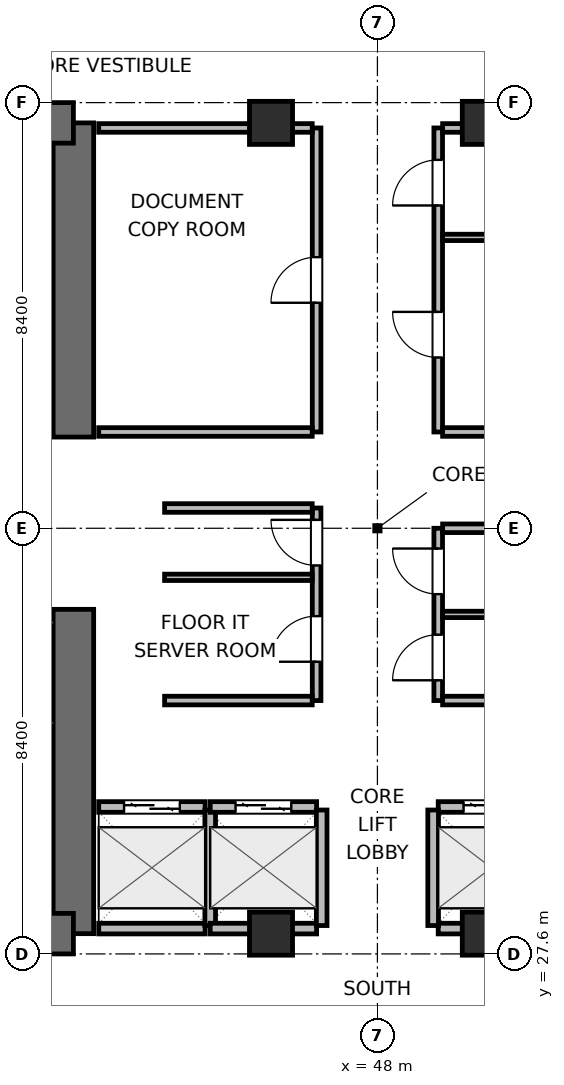
"""IFC4 building model, lengths in metres.
Left out: names, types, materials, properties, quantities, classifications, styles, units other than length and angle.
Written with IfcOpenShell. Run it as: python <this file> out.ifc"""

import sys

from ifc_helpers import new_model, si_unit, direction, frame, frame_2d, origin, origin_2d, place, context, subcontext, project, spatial, rectangle, extrude, element, fill, save


model = new_model("IFC4")
c1 = context("Model", 3, precision=1e-05, world=origin(), true_north=direction((0.0, 1.0)))
c2 = subcontext(c1, "Body", "Model", "MODEL_VIEW")
j1 = project(units=[si_unit("LENGTHUNIT", "METRE"), si_unit("PLANEANGLEUNIT", "RADIAN")], contexts=[c1])
p1 = place(None, origin())
s1 = spatial("IfcSite", under=j1, at=p1, CompositionType="ELEMENT")
p2 = place(p1, origin())
s2 = spatial("IfcBuilding", under=s1, at=p2, CompositionType="ELEMENT")
p3 = place(p2, frame((0.0, 0.0, 109.2)))
s3 = spatial("IfcBuildingStorey", under=s2, at=p3, CompositionType="ELEMENT", Elevation=109.2)
p4 = place(p3, frame((42.0, 28.0, 0.0), z_axis=(0.0, 0.0, 1.0), x_axis=(0.0, 1.0, 0.0)))
e1 = element("IfcWall", 1, at=p4, inside=s3, PredefinedType="SHEAR", context=c2, shape_type="SweptSolid", body=[
    extrude(rectangle(XDim=6.4, YDim=0.8, at=frame_2d((3.2, 0.0))), origin(), (0.0, 0.0, 1.0), 3.9),
])
p5 = place(p3, frame((42.0, 37.8, 0.0), z_axis=(0.0, 0.0, 1.0), x_axis=(0.0, 1.0, 0.0)))
e2 = element("IfcWall", 2, at=p5, inside=s3, PredefinedType="SHEAR", context=c2, shape_type="SweptSolid", body=[
    extrude(rectangle(XDim=6.2, YDim=0.8, at=frame_2d((3.1, 0.0))), origin(), (0.0, 0.0, 1.0), 3.9),
])
p6 = place(p3, frame((32.8, 28.0, 0.0), z_axis=(0.0, 0.0, 1.0), x_axis=(1.0, 0.0, 0.0)))
e3 = element("IfcWall", 3, at=p6, inside=s3, PredefinedType="SHEAR", context=c2, shape_type="SweptSolid", body=[
    extrude(rectangle(XDim=9.2, YDim=0.8, at=frame_2d((4.6, 0.0))), origin(), (0.0, 0.0, 1.0), 3.9),
])
p7 = place(p6, frame((4.975, 0.0, 0.0)))
e4 = element("IfcOpeningElement", 4, at=p7, cuts=e3, PredefinedType="OPENING", context=c2, shape_type="SweptSolid", body=[
    extrude(rectangle(XDim=1.05, YDim=2.04, at=frame_2d((0.525, 1.02))), frame((0.0, 0.41, 0.0), z_axis=(0.0, -1.0, 0.0), x_axis=(1.0, 0.0, 0.0)), (0.0, 0.0, 1.0), 0.82),
])
p8 = place(p3, frame((32.8, 44.0, 0.0), z_axis=(0.0, 0.0, 1.0), x_axis=(1.0, 0.0, 0.0)))
e5 = element("IfcWall", 5, at=p8, inside=s3, PredefinedType="SHEAR", context=c2, shape_type="SweptSolid", body=[
    extrude(rectangle(XDim=9.2, YDim=0.8, at=frame_2d((4.6, 0.0))), origin(), (0.0, 0.0, 1.0), 3.9),
])
p9 = place(p8, frame((0.975, 0.0, 0.0)))
e6 = element("IfcOpeningElement", 6, at=p9, cuts=e5, PredefinedType="OPENING", context=c2, shape_type="SweptSolid", body=[
    extrude(rectangle(XDim=0.95, YDim=2.04, at=frame_2d((0.475, 1.02))), frame((0.0, 0.41, 0.0), z_axis=(0.0, -1.0, 0.0), x_axis=(1.0, 0.0, 0.0)), (0.0, 0.0, 1.0), 0.82),
])
p10 = place(p8, frame((4.225, 0.0, 0.0)))
e7 = element("IfcOpeningElement", 7, at=p10, cuts=e5, PredefinedType="OPENING", context=c2, shape_type="SweptSolid", body=[
    extrude(rectangle(XDim=0.9, YDim=2.02, at=frame_2d((0.45, 1.01))), frame((0.0, 0.41, 0.0), z_axis=(0.0, -1.0, 0.0), x_axis=(1.0, 0.0, 0.0)), (0.0, 0.0, 1.0), 0.82),
])
p11 = place(p8, frame((7.125, 0.0, 0.0)))
e8 = element("IfcOpeningElement", 8, at=p11, cuts=e5, PredefinedType="OPENING", context=c2, shape_type="SweptSolid", body=[
    extrude(rectangle(XDim=0.9, YDim=2.02, at=frame_2d((0.45, 1.01))), frame((0.0, 0.41, 0.0), z_axis=(0.0, -1.0, 0.0), x_axis=(1.0, 0.0, 0.0)), (0.0, 0.0, 1.0), 0.82),
])
for number, where, z_axis, x_axis in (
    (9, (45.9, 28.0, 0.0), (0.0, 0.0, 1.0), (1.0, 0.0, 0.0)),
    (10, (50.1, 28.0, 0.0), (0.0, 0.0, 1.0), (1.0, 0.0, 0.0)),
    (11, (45.9, 44.0, 0.0), (0.0, 0.0, 1.0), (1.0, 0.0, 0.0)),
    (12, (50.1, 44.0, 0.0), (0.0, 0.0, 1.0), (1.0, 0.0, 0.0)),
):
    element("IfcColumn", number, at=place(p3, frame(where, z_axis=z_axis, x_axis=x_axis)), inside=s3, PredefinedType="COLUMN", context=c2, shape_type="SweptSolid", body=[
        extrude(rectangle(XDim=0.85, YDim=0.85, at=origin_2d()), origin(), (0.0, 0.0, 1.0), 3.9),
    ])
p12 = place(p3, frame((42.5, 30.5, 0.0), z_axis=(0.0, 0.0, 1.0), x_axis=(1.0, 0.0, 0.0)))
e13 = element("IfcWall", 13, at=p12, inside=s3, PredefinedType="PARTITIONING", context=c2, shape_type="SweptSolid", body=[
    extrude(rectangle(XDim=2.1, YDim=0.21, at=frame_2d((1.05, 0.0))), origin(), (0.0, 0.0, 1.0), 3.64),
])
p13 = place(p12, frame((0.5, 0.0, 0.0)))
e14 = element("IfcOpeningElement", 14, at=p13, cuts=e13, PredefinedType="OPENING", context=c2, shape_type="SweptSolid", body=[
    extrude(rectangle(XDim=1.1, YDim=2.04, at=frame_2d((0.55, 1.02))), frame((0.0, 0.115, 0.0), z_axis=(0.0, -1.0, 0.0), x_axis=(1.0, 0.0, 0.0)), (0.0, 0.0, 1.0), 0.23),
])
p14 = place(p3, frame((42.5, 28.1, 0.0), z_axis=(0.0, 0.0, 1.0), x_axis=(1.0, 0.0, 0.0)))
e15 = element("IfcWall", 15, at=p14, inside=s3, PredefinedType="PARTITIONING", context=c2, shape_type="SweptSolid", body=[
    extrude(rectangle(XDim=2.1, YDim=0.21, at=frame_2d((1.05, 0.0))), origin(), (0.0, 0.0, 1.0), 2.525),
])
p15 = place(p3, frame((44.7, 28.16, 0.0), z_axis=(0.0, 0.0, 1.0), x_axis=(0.0, 1.0, 0.0)))
e16 = element("IfcWall", 16, at=p15, inside=s3, PredefinedType="PARTITIONING", context=c2, shape_type="SweptSolid", body=[
    extrude(rectangle(XDim=2.28, YDim=0.21, at=frame_2d((1.14, 0.0))), origin(), (0.0, 0.0, 1.0), 3.64),
])
p16 = place(p3, frame((44.7, 30.5, 0.0), z_axis=(0.0, 0.0, 1.0), x_axis=(1.0, 0.0, 0.0)))
e17 = element("IfcWall", 17, at=p16, inside=s3, PredefinedType="PARTITIONING", context=c2, shape_type="SweptSolid", body=[
    extrude(rectangle(XDim=2.1, YDim=0.21, at=frame_2d((1.05, 0.0))), origin(), (0.0, 0.0, 1.0), 3.64),
])
p17 = place(p16, frame((0.5, 0.0, 0.0)))
e18 = element("IfcOpeningElement", 18, at=p17, cuts=e17, PredefinedType="OPENING", context=c2, shape_type="SweptSolid", body=[
    extrude(rectangle(XDim=1.1, YDim=2.04, at=frame_2d((0.55, 1.02))), frame((0.0, 0.115, 0.0), z_axis=(0.0, -1.0, 0.0), x_axis=(1.0, 0.0, 0.0)), (0.0, 0.0, 1.0), 0.23),
])
p18 = place(p3, frame((44.7, 28.1, 0.0), z_axis=(0.0, 0.0, 1.0), x_axis=(1.0, 0.0, 0.0)))
e19 = element("IfcWall", 19, at=p18, inside=s3, PredefinedType="PARTITIONING", context=c2, shape_type="SweptSolid", body=[
    extrude(rectangle(XDim=2.1, YDim=0.21, at=frame_2d((1.05, 0.0))), origin(), (0.0, 0.0, 1.0), 2.525),
])
p19 = place(p3, frame((46.9, 28.16, 0.0), z_axis=(0.0, 0.0, 1.0), x_axis=(0.0, 1.0, 0.0)))
e20 = element("IfcWall", 20, at=p19, inside=s3, PredefinedType="PARTITIONING", context=c2, shape_type="SweptSolid", body=[
    extrude(rectangle(XDim=2.28, YDim=0.21, at=frame_2d((1.14, 0.0))), origin(), (0.0, 0.0, 1.0), 3.64),
])
p20 = place(p3, frame((49.2, 30.5, 0.0), z_axis=(0.0, 0.0, 1.0), x_axis=(1.0, 0.0, 0.0)))
e21 = element("IfcWall", 21, at=p20, inside=s3, PredefinedType="PARTITIONING", context=c2, shape_type="SweptSolid", body=[
    extrude(rectangle(XDim=2.1, YDim=0.21, at=frame_2d((1.05, 0.0))), origin(), (0.0, 0.0, 1.0), 3.64),
])
p21 = place(p20, frame((0.5, 0.0, 0.0)))
e22 = element("IfcOpeningElement", 22, at=p21, cuts=e21, PredefinedType="OPENING", context=c2, shape_type="SweptSolid", body=[
    extrude(rectangle(XDim=1.1, YDim=2.04, at=frame_2d((0.55, 1.02))), frame((0.0, 0.115, 0.0), z_axis=(0.0, -1.0, 0.0), x_axis=(1.0, 0.0, 0.0)), (0.0, 0.0, 1.0), 0.23),
])
p22 = place(p3, frame((49.2, 28.1, 0.0), z_axis=(0.0, 0.0, 1.0), x_axis=(1.0, 0.0, 0.0)))
e23 = element("IfcWall", 23, at=p22, inside=s3, PredefinedType="PARTITIONING", context=c2, shape_type="SweptSolid", body=[
    extrude(rectangle(XDim=2.1, YDim=0.21, at=frame_2d((1.05, 0.0))), origin(), (0.0, 0.0, 1.0), 2.525),
])
p23 = place(p3, frame((49.1, 28.16, 0.0), z_axis=(0.0, 0.0, 1.0), x_axis=(0.0, 1.0, 0.0)))
e24 = element("IfcWall", 24, at=p23, inside=s3, PredefinedType="PARTITIONING", context=c2, shape_type="SweptSolid", body=[
    extrude(rectangle(XDim=2.28, YDim=0.21, at=frame_2d((1.14, 0.0))), origin(), (0.0, 0.0, 1.0), 3.64),
])
p24 = place(p3, frame((46.8, 32.6, 0.0), z_axis=(0.0, 0.0, 1.0), x_axis=(0.0, 1.0, 0.0)))
e25 = element("IfcWall", 25, at=p24, inside=s3, PredefinedType="PARTITIONING", context=c2, shape_type="SweptSolid", body=[
    extrude(rectangle(XDim=3.8, YDim=0.17, at=frame_2d((1.9, 0.0))), origin(), (0.0, 0.0, 1.0), 3.64),
])
p25 = place(p24, frame((0.766, 0.0, 0.0)))
e26 = element("IfcOpeningElement", 26, at=p25, cuts=e25, PredefinedType="OPENING", context=c2, shape_type="SweptSolid", body=[
    extrude(rectangle(XDim=0.9, YDim=2.02, at=frame_2d((0.45, 1.01))), frame((0.0, 0.095, 0.0), z_axis=(0.0, -1.0, 0.0), x_axis=(1.0, 0.0, 0.0)), (0.0, 0.0, 1.0), 0.19),
])
p26 = place(p24, frame((2.666, 0.0, 0.0)))
e27 = element("IfcOpeningElement", 27, at=p26, cuts=e25, PredefinedType="OPENING", context=c2, shape_type="SweptSolid", body=[
    extrude(rectangle(XDim=0.9, YDim=2.02, at=frame_2d((0.45, 1.01))), frame((0.0, 0.095, 0.0), z_axis=(0.0, -1.0, 0.0), x_axis=(1.0, 0.0, 0.0)), (0.0, 0.0, 1.0), 0.19),
])
for number, where, z_axis, x_axis in (
    (28, (43.8, 32.6, 0.0), (0.0, 0.0, 1.0), (1.0, 0.0, 0.0)),
    (29, (43.8, 36.4, 0.0), (0.0, 0.0, 1.0), (1.0, 0.0, 0.0)),
):
    element("IfcWall", number, at=place(p3, frame(where, z_axis=z_axis, x_axis=x_axis)), inside=s3, PredefinedType="PARTITIONING", context=c2, shape_type="SweptSolid", body=[
        extrude(rectangle(XDim=2.913, YDim=0.17, at=frame_2d((1.457, 0.0))), origin(), (0.0, 0.0, 1.0), 3.64),
    ])
p27 = place(p3, frame((43.8, 35.032, 0.0), z_axis=(0.0, 0.0, 1.0), x_axis=(1.0, 0.0, 0.0)))
e30 = element("IfcWall", 30, at=p27, inside=s3, PredefinedType="PARTITIONING", context=c2, shape_type="SweptSolid", body=[
    extrude(rectangle(XDim=2.913, YDim=0.125, at=frame_2d((1.457, 0.0))), origin(), (0.0, 0.0, 1.0), 3.64),
])
p28 = place(p3, frame((49.2, 32.6, 0.0), z_axis=(0.0, 0.0, 1.0), x_axis=(0.0, 1.0, 0.0)))
e31 = element("IfcWall", 31, at=p28, inside=s3, PredefinedType="PARTITIONING", context=c2, shape_type="SweptSolid", body=[
    extrude(rectangle(XDim=3.4, YDim=0.17, at=frame_2d((1.7, 0.0))), origin(), (0.0, 0.0, 1.0), 3.64),
])
p29 = place(p28, frame((0.4, 0.0, 0.0)))
e32 = element("IfcOpeningElement", 32, at=p29, cuts=e31, PredefinedType="OPENING", context=c2, shape_type="SweptSolid", body=[
    extrude(rectangle(XDim=0.9, YDim=2.02, at=frame_2d((0.45, 1.01))), frame((0.0, 0.095, 0.0), z_axis=(0.0, -1.0, 0.0), x_axis=(1.0, 0.0, 0.0)), (0.0, 0.0, 1.0), 0.19),
])
p30 = place(p28, frame((2.1, 0.0, 0.0)))
e33 = element("IfcOpeningElement", 33, at=p30, cuts=e31, PredefinedType="OPENING", context=c2, shape_type="SweptSolid", body=[
    extrude(rectangle(XDim=0.9, YDim=2.02, at=frame_2d((0.45, 1.01))), frame((0.0, 0.095, 0.0), z_axis=(0.0, -1.0, 0.0), x_axis=(1.0, 0.0, 0.0)), (0.0, 0.0, 1.0), 0.19),
])
for number, where, z_axis, x_axis in (
    (34, (49.287, 32.6, 0.0), (0.0, 0.0, 1.0), (1.0, 0.0, 0.0)),
    (35, (49.287, 36.0, 0.0), (0.0, 0.0, 1.0), (1.0, 0.0, 0.0)),
):
    element("IfcWall", number, at=place(p3, frame(where, z_axis=z_axis, x_axis=x_axis)), inside=s3, PredefinedType="PARTITIONING", context=c2, shape_type="SweptSolid", body=[
        extrude(rectangle(XDim=2.913, YDim=0.17, at=frame_2d((1.457, 0.0))), origin(), (0.0, 0.0, 1.0), 3.64),
    ])
p31 = place(p3, frame((49.287, 34.3, 0.0), z_axis=(0.0, 0.0, 1.0), x_axis=(1.0, 0.0, 0.0)))
e36 = element("IfcWall", 36, at=p31, inside=s3, PredefinedType="PARTITIONING", context=c2, shape_type="SweptSolid", body=[
    extrude(rectangle(XDim=2.913, YDim=0.125, at=frame_2d((1.457, 0.0))), origin(), (0.0, 0.0, 1.0), 3.64),
])
p32 = place(p3, frame((46.8, 37.9, 0.0), z_axis=(0.0, 0.0, 1.0), x_axis=(0.0, 1.0, 0.0)))
e37 = element("IfcWall", 37, at=p32, inside=s3, PredefinedType="PARTITIONING", context=c2, shape_type="SweptSolid", body=[
    extrude(rectangle(XDim=6.0, YDim=0.17, at=frame_2d((3.0, 0.0))), origin(), (0.0, 0.0, 1.0), 3.64),
])
p33 = place(p32, frame((2.55, 0.0, 0.0)))
e38 = element("IfcOpeningElement", 38, at=p33, cuts=e37, PredefinedType="OPENING", context=c2, shape_type="SweptSolid", body=[
    extrude(rectangle(XDim=0.9, YDim=2.02, at=frame_2d((0.45, 1.01))), frame((0.0, 0.095, 0.0), z_axis=(0.0, -1.0, 0.0), x_axis=(1.0, 0.0, 0.0)), (0.0, 0.0, 1.0), 0.19),
])
p34 = place(p3, frame((42.5, 37.9, 0.0), z_axis=(0.0, 0.0, 1.0), x_axis=(1.0, 0.0, 0.0)))
e39 = element("IfcWall", 39, at=p34, inside=s3, PredefinedType="PARTITIONING", context=c2, shape_type="SweptSolid", body=[
    extrude(rectangle(XDim=4.213, YDim=0.17, at=frame_2d((2.106, 0.0))), origin(), (0.0, 0.0, 1.0), 3.64),
])
p35 = place(p3, frame((42.5, 43.9, 0.0), z_axis=(0.0, 0.0, 1.0), x_axis=(1.0, 0.0, 0.0)))
e40 = element("IfcWall", 40, at=p35, inside=s3, PredefinedType="PARTITIONING", context=c2, shape_type="SweptSolid", body=[
    extrude(rectangle(XDim=4.213, YDim=0.17, at=frame_2d((2.106, 0.0))), origin(), (0.0, 0.0, 1.0), 2.525),
])
p36 = place(p3, frame((49.2, 37.9, 0.0), z_axis=(0.0, 0.0, 1.0), x_axis=(0.0, 1.0, 0.0)))
e41 = element("IfcWall", 41, at=p36, inside=s3, PredefinedType="PARTITIONING", context=c2, shape_type="SweptSolid", body=[
    extrude(rectangle(XDim=6.0, YDim=0.17, at=frame_2d((3.0, 0.0))), origin(), (0.0, 0.0, 1.0), 3.64),
])
p37 = place(p36, frame((1.47, 0.0, 0.0)))
e42 = element("IfcOpeningElement", 42, at=p37, cuts=e41, PredefinedType="OPENING", context=c2, shape_type="SweptSolid", body=[
    extrude(rectangle(XDim=0.9, YDim=2.02, at=frame_2d((0.45, 1.01))), frame((0.0, 0.095, 0.0), z_axis=(0.0, -1.0, 0.0), x_axis=(1.0, 0.0, 0.0)), (0.0, 0.0, 1.0), 0.19),
])
p38 = place(p36, frame((4.47, 0.0, 0.0)))
e43 = element("IfcOpeningElement", 43, at=p38, cuts=e41, PredefinedType="OPENING", context=c2, shape_type="SweptSolid", body=[
    extrude(rectangle(XDim=0.9, YDim=2.02, at=frame_2d((0.45, 1.01))), frame((0.0, 0.095, 0.0), z_axis=(0.0, -1.0, 0.0), x_axis=(1.0, 0.0, 0.0)), (0.0, 0.0, 1.0), 0.19),
])
p39 = place(p3, frame((49.287, 37.9, 0.0), z_axis=(0.0, 0.0, 1.0), x_axis=(1.0, 0.0, 0.0)))
e44 = element("IfcWall", 44, at=p39, inside=s3, PredefinedType="PARTITIONING", context=c2, shape_type="SweptSolid", body=[
    extrude(rectangle(XDim=4.113, YDim=0.17, at=frame_2d((2.056, 0.0))), origin(), (0.0, 0.0, 1.0), 3.64),
])
p40 = place(p3, frame((49.287, 43.9, 0.0), z_axis=(0.0, 0.0, 1.0), x_axis=(1.0, 0.0, 0.0)))
e45 = element("IfcWall", 45, at=p40, inside=s3, PredefinedType="PARTITIONING", context=c2, shape_type="SweptSolid", body=[
    extrude(rectangle(XDim=4.113, YDim=0.17, at=frame_2d((2.056, 0.0))), origin(), (0.0, 0.0, 1.0), 2.525),
])
p41 = place(p3, frame((49.287, 41.74, 0.0), z_axis=(0.0, 0.0, 1.0), x_axis=(1.0, 0.0, 0.0)))
e46 = element("IfcWall", 46, at=p41, inside=s3, PredefinedType="PARTITIONING", context=c2, shape_type="SweptSolid", body=[
    extrude(rectangle(XDim=4.113, YDim=0.125, at=frame_2d((2.056, 0.0))), origin(), (0.0, 0.0, 1.0), 3.64),
])
p42 = place(p13, origin())
e47 = element("IfcDoor", 47, at=p42, inside=s3, OperationType="DOUBLE_DOOR_SLIDING", PredefinedType="DOOR", context=c2, shape_type="SweptSolid", body=[
    extrude(rectangle(XDim=1.1, YDim=2.04, at=frame_2d((0.55, 1.02))), frame((0.0, 0.025, 0.0), z_axis=(0.0, -1.0, 0.0), x_axis=(1.0, 0.0, 0.0)), (0.0, 0.0, 1.0), 0.05),
])
fill(e14, e47)
p43 = place(p17, origin())
e48 = element("IfcDoor", 48, at=p43, inside=s3, OperationType="DOUBLE_DOOR_SLIDING", PredefinedType="DOOR", context=c2, shape_type="SweptSolid", body=[
    extrude(rectangle(XDim=1.1, YDim=2.04, at=frame_2d((0.55, 1.02))), frame((0.0, 0.025, 0.0), z_axis=(0.0, -1.0, 0.0), x_axis=(1.0, 0.0, 0.0)), (0.0, 0.0, 1.0), 0.05),
])
fill(e18, e48)
p44 = place(p21, origin())
e49 = element("IfcDoor", 49, at=p44, inside=s3, OperationType="DOUBLE_DOOR_SLIDING", PredefinedType="DOOR", context=c2, shape_type="SweptSolid", body=[
    extrude(rectangle(XDim=1.1, YDim=2.04, at=frame_2d((0.55, 1.02))), frame((0.0, 0.025, 0.0), z_axis=(0.0, -1.0, 0.0), x_axis=(1.0, 0.0, 0.0)), (0.0, 0.0, 1.0), 0.05),
])
fill(e22, e49)
p45 = place(p25, origin())
e50 = element("IfcDoor", 50, at=p45, inside=s3, OperationType="SINGLE_SWING_LEFT", PredefinedType="DOOR", context=c2, shape_type="SweptSolid", body=[
    extrude(rectangle(XDim=0.9, YDim=2.02, at=frame_2d((0.45, 1.01))), frame((0.0, 0.025, 0.0), z_axis=(0.0, -1.0, 0.0), x_axis=(1.0, 0.0, 0.0)), (0.0, 0.0, 1.0), 0.05),
])
fill(e26, e50)
p46 = place(p26, origin())
e51 = element("IfcDoor", 51, at=p46, inside=s3, OperationType="SINGLE_SWING_RIGHT", PredefinedType="DOOR", context=c2, shape_type="SweptSolid", body=[
    extrude(rectangle(XDim=0.9, YDim=2.02, at=frame_2d((0.45, 1.01))), frame((0.0, 0.025, 0.0), z_axis=(0.0, -1.0, 0.0), x_axis=(1.0, 0.0, 0.0)), (0.0, 0.0, 1.0), 0.05),
])
fill(e27, e51)
p47 = place(p29, origin())
e52 = element("IfcDoor", 52, at=p47, inside=s3, OperationType="SINGLE_SWING_LEFT", PredefinedType="DOOR", context=c2, shape_type="SweptSolid", body=[
    extrude(rectangle(XDim=0.9, YDim=2.02, at=frame_2d((0.45, 1.01))), frame((0.0, 0.025, 0.0), z_axis=(0.0, -1.0, 0.0), x_axis=(1.0, 0.0, 0.0)), (0.0, 0.0, 1.0), 0.05),
])
fill(e32, e52)
p48 = place(p30, origin())
e53 = element("IfcDoor", 53, at=p48, inside=s3, OperationType="SINGLE_SWING_RIGHT", PredefinedType="DOOR", context=c2, shape_type="SweptSolid", body=[
    extrude(rectangle(XDim=0.9, YDim=2.02, at=frame_2d((0.45, 1.01))), frame((0.0, 0.025, 0.0), z_axis=(0.0, -1.0, 0.0), x_axis=(1.0, 0.0, 0.0)), (0.0, 0.0, 1.0), 0.05),
])
fill(e33, e53)
p49 = place(p33, origin())
e54 = element("IfcDoor", 54, at=p49, inside=s3, OperationType="SINGLE_SWING_LEFT", PredefinedType="DOOR", context=c2, shape_type="SweptSolid", body=[
    extrude(rectangle(XDim=0.9, YDim=2.02, at=frame_2d((0.45, 1.01))), frame((0.0, 0.025, 0.0), z_axis=(0.0, -1.0, 0.0), x_axis=(1.0, 0.0, 0.0)), (0.0, 0.0, 1.0), 0.05),
])
fill(e38, e54)
p50 = place(p37, origin())
e55 = element("IfcDoor", 55, at=p50, inside=s3, OperationType="SINGLE_SWING_RIGHT", PredefinedType="DOOR", context=c2, shape_type="SweptSolid", body=[
    extrude(rectangle(XDim=0.9, YDim=2.02, at=frame_2d((0.45, 1.01))), frame((0.0, 0.025, 0.0), z_axis=(0.0, -1.0, 0.0), x_axis=(1.0, 0.0, 0.0)), (0.0, 0.0, 1.0), 0.05),
])
fill(e42, e55)
p51 = place(p38, origin())
e56 = element("IfcDoor", 56, at=p51, inside=s3, OperationType="SINGLE_SWING_LEFT", PredefinedType="DOOR", context=c2, shape_type="SweptSolid", body=[
    extrude(rectangle(XDim=0.9, YDim=2.02, at=frame_2d((0.45, 1.01))), frame((0.0, 0.025, 0.0), z_axis=(0.0, -1.0, 0.0), x_axis=(1.0, 0.0, 0.0)), (0.0, 0.0, 1.0), 0.05),
])
fill(e43, e56)
save(model, sys.argv[1])
